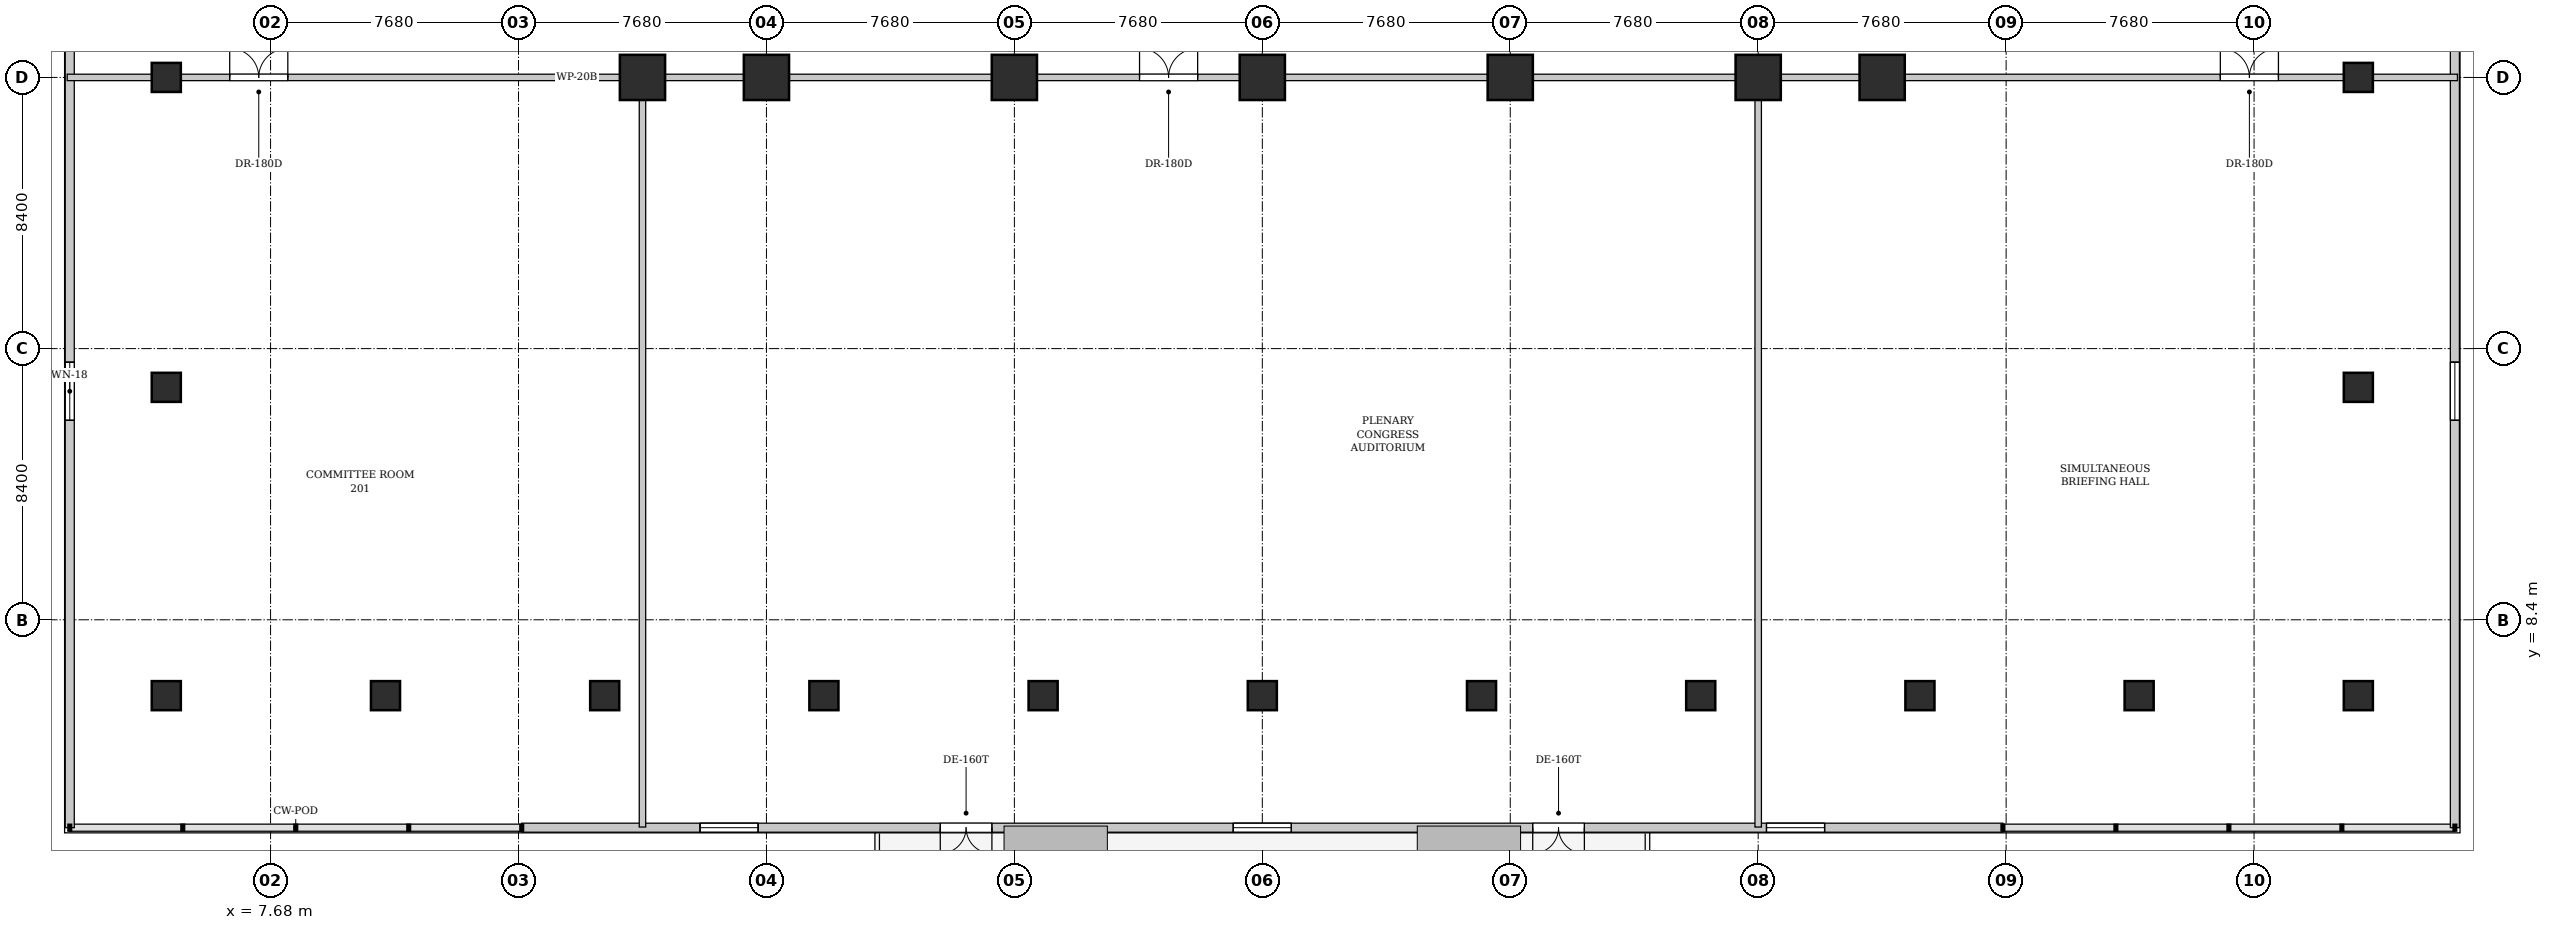
"""IFC4 building model, lengths in metres.
Left out: names, types, materials, properties, quantities, classifications, styles, units other than length and angle.
Written with IfcOpenShell. Run it as: python <this file> out.ifc"""

import sys

from ifc_helpers import new_model, si_unit, direction, frame, frame_2d, origin, origin_2d, place, context, subcontext, project, spatial, rectangle, extrude, element, fill, save


model = new_model("IFC4")
c1 = context("Model", 3, precision=1e-05, world=origin(), true_north=direction((0.0, 1.0)))
c2 = subcontext(c1, "Body", "Model", "MODEL_VIEW")
j1 = project(units=[si_unit("LENGTHUNIT", "METRE"), si_unit("PLANEANGLEUNIT", "RADIAN")], contexts=[c1])
p1 = place(None, origin())
s1 = spatial("IfcSite", under=j1, at=p1, CompositionType="ELEMENT")
p2 = place(p1, origin())
s2 = spatial("IfcBuilding", under=s1, at=p2, CompositionType="ELEMENT")
p3 = place(p2, frame((0.0, 0.0, 10.4)))
s3 = spatial("IfcBuildingStorey", under=s2, at=p3, CompositionType="ELEMENT", Elevation=10.4)
for number, where, z_axis, x_axis in (
    (1, (23.04, 25.2, 0.0), (0.0, 0.0, 1.0), (1.0, 0.0, 0.0)),
    (2, (30.72, 25.2, 0.0), (0.0, 0.0, 1.0), (1.0, 0.0, 0.0)),
    (3, (38.4, 25.2, 0.0), (0.0, 0.0, 1.0), (1.0, 0.0, 0.0)),
    (4, (46.08, 25.2, 0.0), (0.0, 0.0, 1.0), (1.0, 0.0, 0.0)),
    (5, (53.76, 25.2, 0.0), (0.0, 0.0, 1.0), (1.0, 0.0, 0.0)),
    (6, (19.2, 25.2, 0.0), (0.0, 0.0, 1.0), (1.0, 0.0, 0.0)),
    (7, (57.6, 25.2, 0.0), (0.0, 0.0, 1.0), (1.0, 0.0, 0.0)),
):
    element("IfcColumn", number, at=place(p3, frame(where, z_axis=z_axis, x_axis=x_axis)), inside=s3, PredefinedType="COLUMN", context=c2, shape_type="SweptSolid", body=[
        extrude(rectangle(XDim=1.4, YDim=1.4, at=origin_2d()), origin(), (0.0, 0.0, 1.0), 5.2),
    ])
for number, where, z_axis, x_axis in (
    (8, (4.45, 6.05, 0.0), (0.0, 0.0, 1.0), (1.0, 0.0, 0.0)),
    (9, (11.24, 6.05, 0.0), (0.0, 0.0, 1.0), (1.0, 0.0, 0.0)),
    (10, (18.03, 6.05, 0.0), (0.0, 0.0, 1.0), (1.0, 0.0, 0.0)),
    (11, (24.82, 6.05, 0.0), (0.0, 0.0, 1.0), (1.0, 0.0, 0.0)),
    (12, (31.61, 6.05, 0.0), (0.0, 0.0, 1.0), (1.0, 0.0, 0.0)),
    (13, (38.4, 6.05, 0.0), (0.0, 0.0, 1.0), (1.0, 0.0, 0.0)),
    (14, (45.19, 6.05, 0.0), (0.0, 0.0, 1.0), (1.0, 0.0, 0.0)),
    (15, (51.98, 6.05, 0.0), (0.0, 0.0, 1.0), (1.0, 0.0, 0.0)),
    (16, (58.77, 6.05, 0.0), (0.0, 0.0, 1.0), (1.0, 0.0, 0.0)),
    (17, (65.56, 6.05, 0.0), (0.0, 0.0, 1.0), (1.0, 0.0, 0.0)),
    (18, (72.35, 6.05, 0.0), (0.0, 0.0, 1.0), (1.0, 0.0, 0.0)),
    (19, (4.45, 15.6, 0.0), (0.0, 0.0, 1.0), (1.0, 0.0, 0.0)),
    (20, (72.35, 15.6, 0.0), (0.0, 0.0, 1.0), (1.0, 0.0, 0.0)),
    (21, (4.45, 25.2, 0.0), (0.0, 0.0, 1.0), (1.0, 0.0, 0.0)),
    (22, (72.35, 25.2, 0.0), (0.0, 0.0, 1.0), (1.0, 0.0, 0.0)),
):
    element("IfcColumn", number, at=place(p3, frame(where, z_axis=z_axis, x_axis=x_axis)), inside=s3, PredefinedType="COLUMN", context=c2, shape_type="SweptSolid", body=[
        extrude(rectangle(XDim=0.9, YDim=0.9, at=origin_2d()), origin(), (0.0, 0.0, 1.0), 5.2),
    ])
p4 = place(p3, frame((1.46, 1.96, 0.0), z_axis=(0.0, 0.0, 1.0), x_axis=(0.0, 1.0, 0.0)))
e23 = element("IfcWall", 23, at=p4, inside=s3, PredefinedType="SOLIDWALL", context=c2, shape_type="SweptSolid", body=[
    extrude(rectangle(XDim=48.28, YDim=0.28, at=frame_2d((24.14, 0.0))), origin(), (0.0, 0.0, 1.0), 4.94),
])
p5 = place(p4, frame((12.618, 0.0, 1.0)))
e24 = element("IfcOpeningElement", 24, at=p5, cuts=e23, PredefinedType="OPENING", context=c2, shape_type="SweptSolid", body=[
    extrude(rectangle(XDim=1.8, YDim=2.0, at=frame_2d((0.9, 1.0))), frame((0.0, 0.15, 0.0), z_axis=(0.0, -1.0, 0.0), x_axis=(1.0, 0.0, 0.0)), (0.0, 0.0, 1.0), 0.3),
])
p6 = place(p4, frame((33.862, 0.0, 1.0)))
e25 = element("IfcOpeningElement", 25, at=p6, cuts=e23, PredefinedType="OPENING", context=c2, shape_type="SweptSolid", body=[
    extrude(rectangle(XDim=1.8, YDim=2.0, at=frame_2d((0.9, 1.0))), frame((0.0, 0.15, 0.0), z_axis=(0.0, -1.0, 0.0), x_axis=(1.0, 0.0, 0.0)), (0.0, 0.0, 1.0), 0.3),
])
p7 = place(p3, frame((75.34, 50.24, 0.0), z_axis=(0.0, 0.0, 1.0), x_axis=(0.0, -1.0, 0.0)))
e26 = element("IfcWall", 26, at=p7, inside=s3, PredefinedType="SOLIDWALL", context=c2, shape_type="SweptSolid", body=[
    extrude(rectangle(XDim=48.28, YDim=0.28, at=frame_2d((24.14, 0.0))), origin(), (0.0, 0.0, 1.0), 4.94),
])
p8 = place(p7, frame((12.618, 0.0, 1.0)))
e27 = element("IfcOpeningElement", 27, at=p8, cuts=e26, PredefinedType="OPENING", context=c2, shape_type="SweptSolid", body=[
    extrude(rectangle(XDim=1.8, YDim=2.0, at=frame_2d((0.9, 1.0))), frame((0.0, 0.15, 0.0), z_axis=(0.0, -1.0, 0.0), x_axis=(1.0, 0.0, 0.0)), (0.0, 0.0, 1.0), 0.3),
])
p9 = place(p7, frame((33.862, 0.0, 1.0)))
e28 = element("IfcOpeningElement", 28, at=p9, cuts=e26, PredefinedType="OPENING", context=c2, shape_type="SweptSolid", body=[
    extrude(rectangle(XDim=1.8, YDim=2.0, at=frame_2d((0.9, 1.0))), frame((0.0, 0.15, 0.0), z_axis=(0.0, -1.0, 0.0), x_axis=(1.0, 0.0, 0.0)), (0.0, 0.0, 1.0), 0.3),
])
p10 = place(p3, frame((15.46, 1.96, 0.0), z_axis=(0.0, 0.0, 1.0), x_axis=(1.0, 0.0, 0.0)))
e29 = element("IfcWall", 29, at=p10, inside=s3, PredefinedType="SOLIDWALL", context=c2, shape_type="SweptSolid", body=[
    extrude(rectangle(XDim=45.88, YDim=0.28, at=frame_2d((22.94, 0.0))), origin(), (0.0, 0.0, 1.0), 4.94),
])
p11 = place(p10, frame((12.964, 0.0, 0.0)))
e30 = element("IfcOpeningElement", 30, at=p11, cuts=e29, PredefinedType="OPENING", context=c2, shape_type="SweptSolid", body=[
    extrude(rectangle(XDim=1.6, YDim=2.25, at=frame_2d((0.8, 1.125))), frame((0.0, 0.15, 0.0), z_axis=(0.0, -1.0, 0.0), x_axis=(1.0, 0.0, 0.0)), (0.0, 0.0, 1.0), 0.3),
])
p12 = place(p10, frame((31.316, 0.0, 0.0)))
e31 = element("IfcOpeningElement", 31, at=p12, cuts=e29, PredefinedType="OPENING", context=c2, shape_type="SweptSolid", body=[
    extrude(rectangle(XDim=1.6, YDim=2.25, at=frame_2d((0.8, 1.125))), frame((0.0, 0.15, 0.0), z_axis=(0.0, -1.0, 0.0), x_axis=(1.0, 0.0, 0.0)), (0.0, 0.0, 1.0), 0.3),
])
p13 = place(p10, frame((5.523, 0.0, 0.9)))
e32 = element("IfcOpeningElement", 32, at=p13, cuts=e29, PredefinedType="OPENING", context=c2, shape_type="SweptSolid", body=[
    extrude(rectangle(XDim=1.8, YDim=2.0, at=frame_2d((0.9, 1.0))), frame((0.0, 0.15, 0.0), z_axis=(0.0, -1.0, 0.0), x_axis=(1.0, 0.0, 0.0)), (0.0, 0.0, 1.0), 0.3),
])
p14 = place(p10, frame((22.04, 0.0, 0.9)))
e33 = element("IfcOpeningElement", 33, at=p14, cuts=e29, PredefinedType="OPENING", context=c2, shape_type="SweptSolid", body=[
    extrude(rectangle(XDim=1.8, YDim=2.0, at=frame_2d((0.9, 1.0))), frame((0.0, 0.15, 0.0), z_axis=(0.0, -1.0, 0.0), x_axis=(1.0, 0.0, 0.0)), (0.0, 0.0, 1.0), 0.3),
])
p15 = place(p10, frame((38.557, 0.0, 0.9)))
e34 = element("IfcOpeningElement", 34, at=p15, cuts=e29, PredefinedType="OPENING", context=c2, shape_type="SweptSolid", body=[
    extrude(rectangle(XDim=1.8, YDim=2.0, at=frame_2d((0.9, 1.0))), frame((0.0, 0.15, 0.0), z_axis=(0.0, -1.0, 0.0), x_axis=(1.0, 0.0, 0.0)), (0.0, 0.0, 1.0), 0.3),
])
for number, where, z_axis, x_axis in (
    (35, (19.2, 1.98, 0.0), (0.0, 0.0, 1.0), (0.0, 1.0, 0.0)),
    (36, (53.76, 1.98, 0.0), (0.0, 0.0, 1.0), (0.0, 1.0, 0.0)),
):
    element("IfcWall", number, at=place(p3, frame(where, z_axis=z_axis, x_axis=x_axis)), inside=s3, PredefinedType="PARTITIONING", context=c2, shape_type="SweptSolid", body=[
        extrude(rectangle(XDim=23.22, YDim=0.2, at=frame_2d((11.61, 0.0))), origin(), (0.0, 0.0, 1.0), 4.035),
    ])
p16 = place(p3, frame((1.38, 25.2, 0.0), z_axis=(0.0, 0.0, 1.0), x_axis=(1.0, 0.0, 0.0)))
e37 = element("IfcWall", 37, at=p16, inside=s3, PredefinedType="PARTITIONING", context=c2, shape_type="SweptSolid", body=[
    extrude(rectangle(XDim=74.04, YDim=0.2, at=frame_2d((37.02, 0.0))), origin(), (0.0, 0.0, 1.0), 4.035),
])
p17 = place(p16, frame((5.034, 0.0, 0.0)))
e38 = element("IfcOpeningElement", 38, at=p17, cuts=e37, PredefinedType="OPENING", context=c2, shape_type="SweptSolid", body=[
    extrude(rectangle(XDim=1.8, YDim=2.3, at=frame_2d((0.9, 1.15))), frame((0.0, 0.11, 0.0), z_axis=(0.0, -1.0, 0.0), x_axis=(1.0, 0.0, 0.0)), (0.0, 0.0, 1.0), 0.22),
])
p18 = place(p16, frame((33.217, 0.0, 0.0)))
e39 = element("IfcOpeningElement", 39, at=p18, cuts=e37, PredefinedType="OPENING", context=c2, shape_type="SweptSolid", body=[
    extrude(rectangle(XDim=1.8, YDim=2.3, at=frame_2d((0.9, 1.15))), frame((0.0, 0.11, 0.0), z_axis=(0.0, -1.0, 0.0), x_axis=(1.0, 0.0, 0.0)), (0.0, 0.0, 1.0), 0.22),
])
p19 = place(p16, frame((66.695, 0.0, 0.0)))
e40 = element("IfcOpeningElement", 40, at=p19, cuts=e37, PredefinedType="OPENING", context=c2, shape_type="SweptSolid", body=[
    extrude(rectangle(XDim=1.8, YDim=2.3, at=frame_2d((0.9, 1.15))), frame((0.0, 0.11, 0.0), z_axis=(0.0, -1.0, 0.0), x_axis=(1.0, 0.0, 0.0)), (0.0, 0.0, 1.0), 0.22),
])
p20 = place(p5, origin())
e41 = element("IfcWindow", 41, at=p20, inside=s3, PartitioningType="SINGLE_PANEL", PredefinedType="WINDOW", context=c2, shape_type="SweptSolid", body=[
    extrude(rectangle(XDim=1.8, YDim=2.0, at=frame_2d((0.9, 1.0))), frame((0.0, 0.03, 0.0), z_axis=(0.0, -1.0, 0.0), x_axis=(1.0, 0.0, 0.0)), (0.0, 0.0, 1.0), 0.06),
])
fill(e24, e41)
p21 = place(p9, origin())
e42 = element("IfcWindow", 42, at=p21, inside=s3, PartitioningType="SINGLE_PANEL", PredefinedType="WINDOW", context=c2, shape_type="SweptSolid", body=[
    extrude(rectangle(XDim=1.8, YDim=2.0, at=frame_2d((0.9, 1.0))), frame((0.0, 0.03, 0.0), z_axis=(0.0, -1.0, 0.0), x_axis=(1.0, 0.0, 0.0)), (0.0, 0.0, 1.0), 0.06),
])
fill(e28, e42)
p22 = place(p11, frame((1.6, 0.0, 0.0), z_axis=(0.0, 0.0, 1.0), x_axis=(-1.0, 0.0, 0.0)))
e43 = element("IfcDoor", 43, at=p22, inside=s3, OperationType="SINGLE_SWING_LEFT", PredefinedType="DOOR", context=c2, shape_type="SweptSolid", body=[
    extrude(rectangle(XDim=1.6, YDim=2.25, at=frame_2d((0.8, 1.125))), frame((0.0, 0.025, 0.0), z_axis=(0.0, -1.0, 0.0), x_axis=(1.0, 0.0, 0.0)), (0.0, 0.0, 1.0), 0.05),
])
fill(e30, e43)
p23 = place(p12, frame((1.6, 0.0, 0.0), z_axis=(0.0, 0.0, 1.0), x_axis=(-1.0, 0.0, 0.0)))
e44 = element("IfcDoor", 44, at=p23, inside=s3, OperationType="SINGLE_SWING_LEFT", PredefinedType="DOOR", context=c2, shape_type="SweptSolid", body=[
    extrude(rectangle(XDim=1.6, YDim=2.25, at=frame_2d((0.8, 1.125))), frame((0.0, 0.025, 0.0), z_axis=(0.0, -1.0, 0.0), x_axis=(1.0, 0.0, 0.0)), (0.0, 0.0, 1.0), 0.05),
])
fill(e31, e44)
p24 = place(p13, origin())
e45 = element("IfcWindow", 45, at=p24, inside=s3, PartitioningType="SINGLE_PANEL", PredefinedType="WINDOW", context=c2, shape_type="SweptSolid", body=[
    extrude(rectangle(XDim=1.8, YDim=2.0, at=frame_2d((0.9, 1.0))), frame((0.0, 0.03, 0.0), z_axis=(0.0, -1.0, 0.0), x_axis=(1.0, 0.0, 0.0)), (0.0, 0.0, 1.0), 0.06),
])
fill(e32, e45)
p25 = place(p14, origin())
e46 = element("IfcWindow", 46, at=p25, inside=s3, PartitioningType="SINGLE_PANEL", PredefinedType="WINDOW", context=c2, shape_type="SweptSolid", body=[
    extrude(rectangle(XDim=1.8, YDim=2.0, at=frame_2d((0.9, 1.0))), frame((0.0, 0.03, 0.0), z_axis=(0.0, -1.0, 0.0), x_axis=(1.0, 0.0, 0.0)), (0.0, 0.0, 1.0), 0.06),
])
fill(e33, e46)
p26 = place(p15, origin())
e47 = element("IfcWindow", 47, at=p26, inside=s3, PartitioningType="SINGLE_PANEL", PredefinedType="WINDOW", context=c2, shape_type="SweptSolid", body=[
    extrude(rectangle(XDim=1.8, YDim=2.0, at=frame_2d((0.9, 1.0))), frame((0.0, 0.03, 0.0), z_axis=(0.0, -1.0, 0.0), x_axis=(1.0, 0.0, 0.0)), (0.0, 0.0, 1.0), 0.06),
])
fill(e34, e47)
p27 = place(p17, origin())
e48 = element("IfcDoor", 48, at=p27, inside=s3, OperationType="DOUBLE_DOOR_SINGLE_SWING", PredefinedType="DOOR", context=c2, shape_type="SweptSolid", body=[
    extrude(rectangle(XDim=1.8, YDim=2.3, at=frame_2d((0.9, 1.15))), frame((0.0, 0.025, 0.0), z_axis=(0.0, -1.0, 0.0), x_axis=(1.0, 0.0, 0.0)), (0.0, 0.0, 1.0), 0.05),
])
fill(e38, e48)
p28 = place(p18, origin())
e49 = element("IfcDoor", 49, at=p28, inside=s3, OperationType="DOUBLE_DOOR_SINGLE_SWING", PredefinedType="DOOR", context=c2, shape_type="SweptSolid", body=[
    extrude(rectangle(XDim=1.8, YDim=2.3, at=frame_2d((0.9, 1.15))), frame((0.0, 0.025, 0.0), z_axis=(0.0, -1.0, 0.0), x_axis=(1.0, 0.0, 0.0)), (0.0, 0.0, 1.0), 0.05),
])
fill(e39, e49)
p29 = place(p19, origin())
e50 = element("IfcDoor", 50, at=p29, inside=s3, OperationType="DOUBLE_DOOR_SINGLE_SWING", PredefinedType="DOOR", context=c2, shape_type="SweptSolid", body=[
    extrude(rectangle(XDim=1.8, YDim=2.3, at=frame_2d((0.9, 1.15))), frame((0.0, 0.025, 0.0), z_axis=(0.0, -1.0, 0.0), x_axis=(1.0, 0.0, 0.0)), (0.0, 0.0, 1.0), 0.05),
])
fill(e40, e50)
save(model, sys.argv[1])
